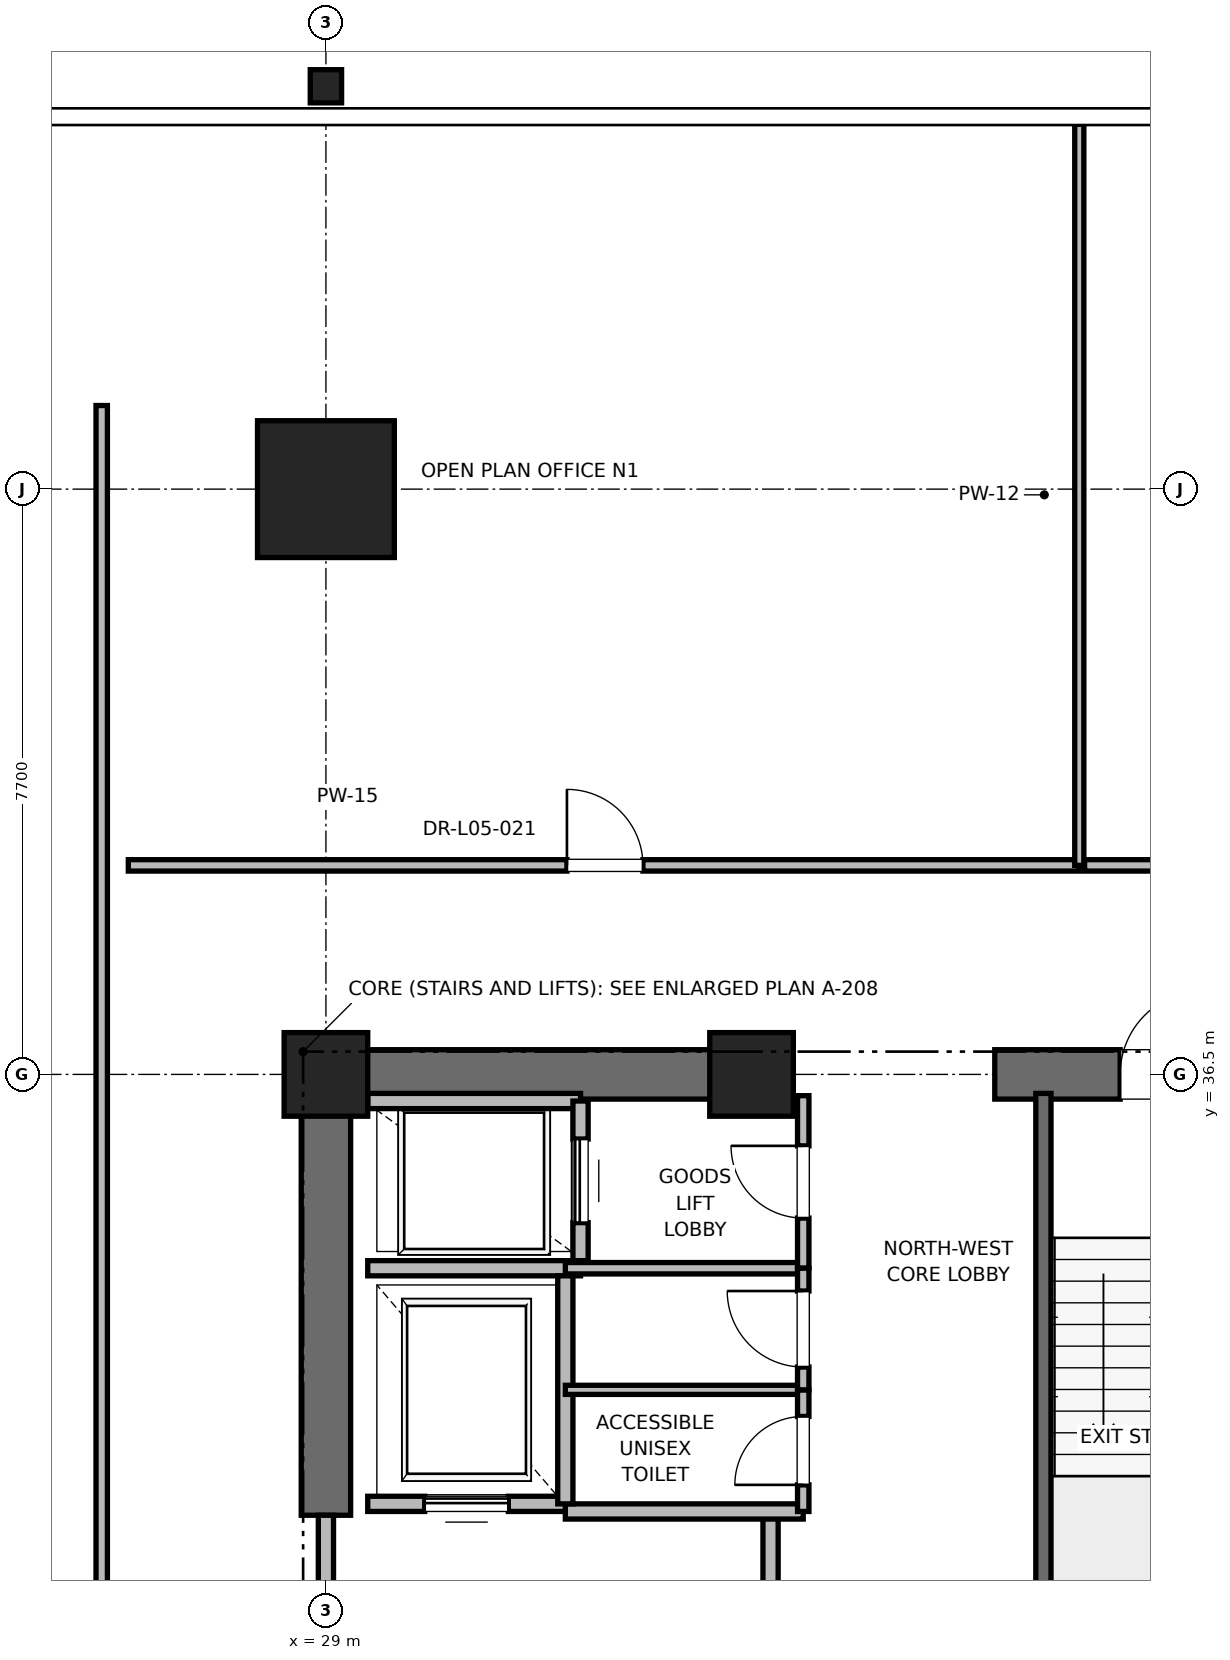
"""IFC4 building model, lengths in metres.
Left out: names, types, materials, properties, quantities, classifications, styles, units other than length and angle.
Written with IfcOpenShell. Run it as: python <this file> out.ifc"""

import sys

from ifc_helpers import new_model, si_unit, direction, frame, frame_2d, origin, origin_2d, place, context, subcontext, project, spatial, rectangle, i_section, extrude, element, fill, save


model = new_model("IFC4")
c1 = context("Model", 3, precision=1e-05, world=origin(), true_north=direction((0.0, 1.0)))
c2 = subcontext(c1, "Body", "Model", "MODEL_VIEW")
j1 = project(units=[si_unit("LENGTHUNIT", "METRE"), si_unit("PLANEANGLEUNIT", "RADIAN")], contexts=[c1])
p1 = place(None, origin())
s1 = spatial("IfcSite", under=j1, at=p1, CompositionType="ELEMENT")
p2 = place(p1, origin())
s2 = spatial("IfcBuilding", under=s1, at=p2, CompositionType="ELEMENT")
p3 = place(p2, frame((0.0, 0.0, 27.6)))
s3 = spatial("IfcBuildingStorey", under=s2, at=p3, CompositionType="ELEMENT", Elevation=27.6)
p4 = place(p3, frame((29.0, 44.2, 0.0), z_axis=(0.0, 0.0, 1.0), x_axis=(1.0, 0.0, 0.0)))
e1 = element("IfcColumn", 1, at=p4, inside=s3, PredefinedType="COLUMN", context=c2, shape_type="SweptSolid", body=[
    extrude(rectangle(XDim=1.8, YDim=1.8, at=origin_2d()), origin(), (0.0, 0.0, 1.0), 4.0),
])
p5 = place(p3, frame((29.0, 49.5, 0.0), z_axis=(0.0, 0.0, 1.0), x_axis=(1.0, 0.0, 0.0)))
e2 = element("IfcColumn", 2, at=p5, inside=s3, PredefinedType="COLUMN", context=c2, shape_type="SweptSolid", body=[
    extrude(i_section(OverallWidth=0.412, OverallDepth=0.437, WebThickness=0.036, FlangeThickness=0.058, FilletRadius=0.015, at=origin_2d()), origin(), (0.0, 0.0, 1.0), 4.0),
])
for number, where, z_axis, x_axis in (
    (3, (29.0, 36.5, 0.0), (0.0, 0.0, 1.0), (1.0, 0.0, 0.0)),
    (4, (34.6, 36.5, 0.0), (0.0, 0.0, 1.0), (1.0, 0.0, 0.0)),
):
    element("IfcColumn", number, at=place(p3, frame(where, z_axis=z_axis, x_axis=x_axis)), inside=s3, PredefinedType="PILASTER", context=c2, shape_type="SweptSolid", body=[
        extrude(rectangle(XDim=1.1, YDim=1.1, at=origin_2d()), origin(), (0.0, 0.0, 1.0), 4.0),
    ])
p6 = place(p3, frame((29.0, 36.5, 0.0), z_axis=(0.0, 0.0, 1.0), x_axis=(1.0, 0.0, 0.0)))
e5 = element("IfcWall", 5, at=p6, inside=s3, PredefinedType="SHEAR", context=c2, shape_type="SweptSolid", body=[
    extrude(rectangle(XDim=5.8, YDim=0.65, at=frame_2d((2.9, 0.0))), origin(), (0.0, 0.0, 1.0), 3.76),
])
p7 = place(p3, frame((37.8, 36.5, 0.0), z_axis=(0.0, 0.0, 1.0), x_axis=(1.0, 0.0, 0.0)))
e6 = element("IfcWall", 6, at=p7, inside=s3, PredefinedType="SHEAR", context=c2, shape_type="SweptSolid", body=[
    extrude(rectangle(XDim=4.4, YDim=0.65, at=frame_2d((2.2, 0.0))), origin(), (0.0, 0.0, 1.0), 3.76),
])
p8 = place(p7, frame((1.65, 0.0, 0.0)))
e7 = element("IfcOpeningElement", 7, at=p8, cuts=e6, PredefinedType="OPENING", context=c2, shape_type="SweptSolid", body=[
    extrude(rectangle(XDim=1.1, YDim=2.15, at=frame_2d((0.55, 1.075))), frame((0.0, 0.325, 0.0), z_axis=(0.0, -1.0, 0.0), x_axis=(1.0, 0.0, 0.0)), (0.0, 0.0, 1.0), 0.65),
])
p9 = place(p3, frame((29.0, 30.7, 0.0), z_axis=(0.0, 0.0, 1.0), x_axis=(0.0, 1.0, 0.0)))
e8 = element("IfcWall", 8, at=p9, inside=s3, PredefinedType="SHEAR", context=c2, shape_type="SweptSolid", body=[
    extrude(rectangle(XDim=5.8, YDim=0.65, at=frame_2d((2.9, 0.0))), origin(), (0.0, 0.0, 1.0), 3.76),
])
p10 = place(p3, frame((38.44, 27.38, 0.0), z_axis=(0.0, 0.0, 1.0), x_axis=(0.0, 1.0, 0.0)))
e9 = element("IfcWall", 9, at=p10, inside=s3, PredefinedType="SOLIDWALL", context=c2, shape_type="SweptSolid", body=[
    extrude(rectangle(XDim=8.87, YDim=0.2, at=frame_2d((4.435, 0.0))), origin(), (0.0, 0.0, 1.0), 3.76),
])
p11 = place(p3, frame((34.85, 27.38, 0.0), z_axis=(0.0, 0.0, 1.0), x_axis=(0.0, 1.0, 0.0)))
e10 = element("IfcWall", 10, at=p11, inside=s3, PredefinedType="PARTITIONING", context=c2, shape_type="SweptSolid", body=[
    extrude(rectangle(XDim=3.37, YDim=0.2, at=frame_2d((1.685, 0.0))), origin(), (0.0, 0.0, 1.0), 3.76),
])
p12 = place(p11, frame((1.11, 0.0, 0.0)))
e11 = element("IfcOpeningElement", 11, at=p12, cuts=e10, PredefinedType="OPENING", context=c2, shape_type="SweptSolid", body=[
    extrude(rectangle(XDim=1.15, YDim=2.2, at=frame_2d((0.575, 1.1))), frame((0.0, 0.1, 0.0), z_axis=(0.0, -1.0, 0.0), x_axis=(1.0, 0.0, 0.0)), (0.0, 0.0, 1.0), 0.2),
])
p13 = place(p3, frame((29.0, 27.3, 0.0), z_axis=(0.0, 0.0, 1.0), x_axis=(0.0, 1.0, 0.0)))
e12 = element("IfcWall", 12, at=p13, inside=s3, PredefinedType="PARTITIONING", context=c2, shape_type="SweptSolid", body=[
    extrude(rectangle(XDim=3.4, YDim=0.2, at=frame_2d((1.7, 0.0))), origin(), (0.0, 0.0, 1.0), 2.54),
])
p14 = place(p13, frame((1.125, 0.0, 0.0)))
e13 = element("IfcOpeningElement", 13, at=p14, cuts=e12, PredefinedType="OPENING", context=c2, shape_type="SweptSolid", body=[
    extrude(rectangle(XDim=1.15, YDim=2.2, at=frame_2d((0.575, 1.1))), frame((0.0, 0.1, 0.0), z_axis=(0.0, -1.0, 0.0), x_axis=(1.0, 0.0, 0.0)), (0.0, 0.0, 1.0), 0.2),
])
p15 = place(p3, frame((32.15, 30.75, 0.0), z_axis=(0.0, 0.0, 1.0), x_axis=(1.0, 0.0, 0.0)))
e14 = element("IfcWall", 14, at=p15, inside=s3, PredefinedType="PARTITIONING", context=c2, shape_type="SweptSolid", body=[
    extrude(rectangle(XDim=3.13, YDim=0.2, at=frame_2d((1.565, 0.0))), origin(), (0.0, 0.0, 1.0), 3.76),
])
p16 = place(p3, frame((29.55, 30.85, 0.0), z_axis=(0.0, 0.0, 1.0), x_axis=(1.0, 0.0, 0.0)))
e15 = element("IfcWall", 15, at=p16, inside=s3, PredefinedType="SOLIDWALL", context=c2, shape_type="SweptSolid", body=[
    extrude(rectangle(XDim=2.6, YDim=0.2, at=frame_2d((1.3, 0.0))), origin(), (0.0, 0.0, 1.0), 2.54),
])
p17 = place(p16, frame((0.75, 0.0, 0.0)))
e16 = element("IfcOpeningElement", 16, at=p17, cuts=e15, PredefinedType="OPENING", context=c2, shape_type="SweptSolid", body=[
    extrude(rectangle(XDim=1.1, YDim=2.2, at=frame_2d((0.55, 1.1))), frame((0.0, 0.1, 0.0), z_axis=(0.0, -1.0, 0.0), x_axis=(1.0, 0.0, 0.0)), (0.0, 0.0, 1.0), 0.2),
])
p18 = place(p3, frame((29.55, 33.95, 0.0), z_axis=(0.0, 0.0, 1.0), x_axis=(1.0, 0.0, 0.0)))
e17 = element("IfcWall", 17, at=p18, inside=s3, PredefinedType="SOLIDWALL", context=c2, shape_type="SweptSolid", body=[
    extrude(rectangle(XDim=2.8, YDim=0.2, at=frame_2d((1.4, 0.0))), origin(), (0.0, 0.0, 1.0), 3.76),
])
p19 = place(p3, frame((32.15, 30.85, 0.0), z_axis=(0.0, 0.0, 1.0), x_axis=(0.0, 1.0, 0.0)))
e18 = element("IfcWall", 18, at=p19, inside=s3, PredefinedType="SOLIDWALL", context=c2, shape_type="SweptSolid", body=[
    extrude(rectangle(XDim=3.0, YDim=0.2, at=frame_2d((1.5, 0.0))), origin(), (0.0, 0.0, 1.0), 3.76),
])
p20 = place(p3, frame((32.35, 36.15, 0.0), z_axis=(0.0, 0.0, 1.0), x_axis=(-1.0, 0.0, 0.0)))
e19 = element("IfcWall", 19, at=p20, inside=s3, PredefinedType="SOLIDWALL", context=c2, shape_type="SweptSolid", body=[
    extrude(rectangle(XDim=2.8, YDim=0.2, at=frame_2d((1.4, 0.0))), origin(), (0.0, 0.0, 1.0), 2.889),
])
p21 = place(p3, frame((32.35, 34.05, 0.0), z_axis=(0.0, 0.0, 1.0), x_axis=(0.0, 1.0, 0.0)))
e20 = element("IfcWall", 20, at=p21, inside=s3, PredefinedType="SOLIDWALL", context=c2, shape_type="SweptSolid", body=[
    extrude(rectangle(XDim=2.1, YDim=0.2, at=frame_2d((1.05, 0.0))), origin(), (0.0, 0.0, 1.0), 3.76),
])
p22 = place(p21, frame((0.5, 0.0, 0.0)))
e21 = element("IfcOpeningElement", 21, at=p22, cuts=e20, PredefinedType="OPENING", context=c2, shape_type="SweptSolid", body=[
    extrude(rectangle(XDim=1.1, YDim=2.2, at=frame_2d((0.55, 1.1))), frame((0.0, 0.1, 0.0), z_axis=(0.0, -1.0, 0.0), x_axis=(1.0, 0.0, 0.0)), (0.0, 0.0, 1.0), 0.2),
])
p23 = place(p3, frame((32.15, 33.95, 0.0), z_axis=(0.0, 0.0, 1.0), x_axis=(1.0, 0.0, 0.0)))
e22 = element("IfcWall", 22, at=p23, inside=s3, PredefinedType="PARTITIONING", context=c2, shape_type="SweptSolid", body=[
    extrude(rectangle(XDim=3.13, YDim=0.15, at=frame_2d((1.565, 0.0))), origin(), (0.0, 0.0, 1.0), 2.85),
])
p24 = place(p3, frame((35.28, 33.95, 0.0), z_axis=(0.0, 0.0, 1.0), x_axis=(0.0, 1.0, 0.0)))
e23 = element("IfcWall", 23, at=p24, inside=s3, PredefinedType="PARTITIONING", context=c2, shape_type="SweptSolid", body=[
    extrude(rectangle(XDim=2.27, YDim=0.15, at=frame_2d((1.135, 0.0))), origin(), (0.0, 0.0, 1.0), 2.54),
])
p25 = place(p24, frame((0.66, 0.0, 0.0)))
e24 = element("IfcOpeningElement", 24, at=p25, cuts=e23, PredefinedType="OPENING", context=c2, shape_type="SweptSolid", body=[
    extrude(rectangle(XDim=0.95, YDim=2.15, at=frame_2d((0.475, 1.075))), frame((0.0, 0.075, 0.0), z_axis=(0.0, -1.0, 0.0), x_axis=(1.0, 0.0, 0.0)), (0.0, 0.0, 1.0), 0.15),
])
p26 = place(p3, frame((32.15, 32.35, 0.0), z_axis=(0.0, 0.0, 1.0), x_axis=(1.0, 0.0, 0.0)))
e25 = element("IfcWall", 25, at=p26, inside=s3, PredefinedType="PARTITIONING", context=c2, shape_type="SweptSolid", body=[
    extrude(rectangle(XDim=3.13, YDim=0.12, at=frame_2d((1.565, 0.0))), origin(), (0.0, 0.0, 1.0), 2.85),
])
p27 = place(p3, frame((35.28, 30.75, 0.0), z_axis=(0.0, 0.0, 1.0), x_axis=(0.0, 1.0, 0.0)))
e26 = element("IfcWall", 26, at=p27, inside=s3, PredefinedType="PARTITIONING", context=c2, shape_type="SweptSolid", body=[
    extrude(rectangle(XDim=1.6, YDim=0.15, at=frame_2d((0.8, 0.0))), origin(), (0.0, 0.0, 1.0), 2.85),
])
p28 = place(p27, frame((0.35, 0.0, 0.0)))
e27 = element("IfcOpeningElement", 27, at=p28, cuts=e26, PredefinedType="OPENING", context=c2, shape_type="SweptSolid", body=[
    extrude(rectangle(XDim=0.9, YDim=2.1, at=frame_2d((0.45, 1.05))), frame((0.0, 0.075, 0.0), z_axis=(0.0, -1.0, 0.0), x_axis=(1.0, 0.0, 0.0)), (0.0, 0.0, 1.0), 0.15),
])
p29 = place(p3, frame((35.28, 32.35, 0.0), z_axis=(0.0, 0.0, 1.0), x_axis=(0.0, 1.0, 0.0)))
e28 = element("IfcWall", 28, at=p29, inside=s3, PredefinedType="PARTITIONING", context=c2, shape_type="SweptSolid", body=[
    extrude(rectangle(XDim=1.6, YDim=0.15, at=frame_2d((0.8, 0.0))), origin(), (0.0, 0.0, 1.0), 2.85),
])
p30 = place(p29, frame((0.3, 0.0, 0.0)))
e29 = element("IfcOpeningElement", 29, at=p30, cuts=e28, PredefinedType="OPENING", context=c2, shape_type="SweptSolid", body=[
    extrude(rectangle(XDim=1.0, YDim=2.15, at=frame_2d((0.5, 1.075))), frame((0.0, 0.075, 0.0), z_axis=(0.0, -1.0, 0.0), x_axis=(1.0, 0.0, 0.0)), (0.0, 0.0, 1.0), 0.15),
])
p31 = place(p3, frame((26.4, 39.25, 0.0), z_axis=(0.0, 0.0, 1.0), x_axis=(1.0, 0.0, 0.0)))
e30 = element("IfcWall", 30, at=p31, inside=s3, PredefinedType="PARTITIONING", context=c2, shape_type="SweptSolid", body=[
    extrude(rectangle(XDim=12.512, YDim=0.15, at=frame_2d((6.256, 0.0))), origin(), (0.0, 0.0, 1.0), 2.85),
])
p32 = place(p31, frame((5.771, 0.0, 0.0)))
e31 = element("IfcOpeningElement", 31, at=p32, cuts=e30, PredefinedType="OPENING", context=c2, shape_type="SweptSolid", body=[
    extrude(rectangle(XDim=1.0, YDim=2.15, at=frame_2d((0.5, 1.075))), frame((0.0, 0.075, 0.0), z_axis=(0.0, -1.0, 0.0), x_axis=(1.0, 0.0, 0.0)), (0.0, 0.0, 1.0), 0.15),
])
p33 = place(p3, frame((38.912, 39.25, 0.0), z_axis=(0.0, 0.0, 1.0), x_axis=(0.0, 1.0, 0.0)))
e32 = element("IfcWall", 32, at=p33, inside=s3, PredefinedType="PARTITIONING", context=c2, shape_type="SweptSolid", body=[
    extrude(rectangle(XDim=9.75, YDim=0.12, at=frame_2d((4.875, 0.0))), origin(), (0.0, 0.0, 1.0), 2.39),
])
p34 = place(p3, frame((38.982, 39.25, 0.0), z_axis=(0.0, 0.0, 1.0), x_axis=(1.0, 0.0, 0.0)))
e33 = element("IfcWall", 33, at=p34, inside=s3, PredefinedType="PARTITIONING", context=c2, shape_type="SweptSolid", body=[
    extrude(rectangle(XDim=14.618, YDim=0.15, at=frame_2d((7.309, 0.0))), origin(), (0.0, 0.0, 1.0), 2.85),
])
p35 = place(p34, frame((6.734, 0.0, 0.0)))
e34 = element("IfcOpeningElement", 34, at=p35, cuts=e33, PredefinedType="OPENING", context=c2, shape_type="SweptSolid", body=[
    extrude(rectangle(XDim=1.05, YDim=2.2, at=frame_2d((0.525, 1.1))), frame((0.0, 0.075, 0.0), z_axis=(0.0, -1.0, 0.0), x_axis=(1.0, 0.0, 0.0)), (0.0, 0.0, 1.0), 0.15),
])
p36 = place(p3, frame((26.05, 9.7, 0.0), z_axis=(0.0, 0.0, 1.0), x_axis=(0.0, 1.0, 0.0)))
e35 = element("IfcWall", 35, at=p36, inside=s3, PredefinedType="PARTITIONING", context=c2, shape_type="SweptSolid", body=[
    extrude(rectangle(XDim=35.6, YDim=0.15, at=frame_2d((17.8, 0.0))), origin(), (0.0, 0.0, 1.0), 2.85),
])
p37 = place(p36, frame((17.3, 0.0, 0.0)))
e36 = element("IfcOpeningElement", 36, at=p37, cuts=e35, PredefinedType="OPENING", context=c2, shape_type="SweptSolid", body=[
    extrude(rectangle(XDim=1.0, YDim=2.15, at=frame_2d((0.5, 1.075))), frame((0.0, 0.075, 0.0), z_axis=(0.0, -1.0, 0.0), x_axis=(1.0, 0.0, 0.0)), (0.0, 0.0, 1.0), 0.15),
])
p38 = place(p8, origin())
e37 = element("IfcDoor", 37, at=p38, inside=s3, OperationType="SINGLE_SWING_RIGHT", PredefinedType="DOOR", context=c2, shape_type="SweptSolid", body=[
    extrude(rectangle(XDim=1.1, YDim=2.15, at=frame_2d((0.55, 1.075))), frame((0.0, 0.025, 0.0), z_axis=(0.0, -1.0, 0.0), x_axis=(1.0, 0.0, 0.0)), (0.0, 0.0, 1.0), 0.05),
])
fill(e7, e37)
p39 = place(p17, origin())
e38 = element("IfcDoor", 38, at=p39, inside=s3, OperationType="SLIDING_TO_RIGHT", PredefinedType="DOOR", context=c2, shape_type="SweptSolid", body=[
    extrude(rectangle(XDim=1.1, YDim=2.2, at=frame_2d((0.55, 1.1))), frame((0.0, 0.025, 0.0), z_axis=(0.0, -1.0, 0.0), x_axis=(1.0, 0.0, 0.0)), (0.0, 0.0, 1.0), 0.05),
])
fill(e16, e38)
p40 = place(p22, origin())
e39 = element("IfcDoor", 39, at=p40, inside=s3, OperationType="SLIDING_TO_RIGHT", PredefinedType="DOOR", context=c2, shape_type="SweptSolid", body=[
    extrude(rectangle(XDim=1.1, YDim=2.2, at=frame_2d((0.55, 1.1))), frame((0.0, 0.025, 0.0), z_axis=(0.0, -1.0, 0.0), x_axis=(1.0, 0.0, 0.0)), (0.0, 0.0, 1.0), 0.05),
])
fill(e21, e39)
p41 = place(p25, origin())
e40 = element("IfcDoor", 40, at=p41, inside=s3, OperationType="SINGLE_SWING_RIGHT", PredefinedType="DOOR", context=c2, shape_type="SweptSolid", body=[
    extrude(rectangle(XDim=0.95, YDim=2.15, at=frame_2d((0.475, 1.075))), frame((0.0, 0.025, 0.0), z_axis=(0.0, -1.0, 0.0), x_axis=(1.0, 0.0, 0.0)), (0.0, 0.0, 1.0), 0.05),
])
fill(e24, e40)
p42 = place(p28, origin())
e41 = element("IfcDoor", 41, at=p42, inside=s3, OperationType="SINGLE_SWING_LEFT", PredefinedType="DOOR", context=c2, shape_type="SweptSolid", body=[
    extrude(rectangle(XDim=0.9, YDim=2.1, at=frame_2d((0.45, 1.05))), frame((0.0, 0.025, 0.0), z_axis=(0.0, -1.0, 0.0), x_axis=(1.0, 0.0, 0.0)), (0.0, 0.0, 1.0), 0.05),
])
fill(e27, e41)
p43 = place(p30, origin())
e42 = element("IfcDoor", 42, at=p43, inside=s3, OperationType="SINGLE_SWING_RIGHT", PredefinedType="DOOR", context=c2, shape_type="SweptSolid", body=[
    extrude(rectangle(XDim=1.0, YDim=2.15, at=frame_2d((0.5, 1.075))), frame((0.0, 0.025, 0.0), z_axis=(0.0, -1.0, 0.0), x_axis=(1.0, 0.0, 0.0)), (0.0, 0.0, 1.0), 0.05),
])
fill(e29, e42)
p44 = place(p32, origin())
e43 = element("IfcDoor", 43, at=p44, inside=s3, OperationType="SINGLE_SWING_LEFT", PredefinedType="DOOR", context=c2, shape_type="SweptSolid", body=[
    extrude(rectangle(XDim=1.0, YDim=2.15, at=frame_2d((0.5, 1.075))), frame((0.0, 0.025, 0.0), z_axis=(0.0, -1.0, 0.0), x_axis=(1.0, 0.0, 0.0)), (0.0, 0.0, 1.0), 0.05),
])
fill(e31, e43)
save(model, sys.argv[1])
